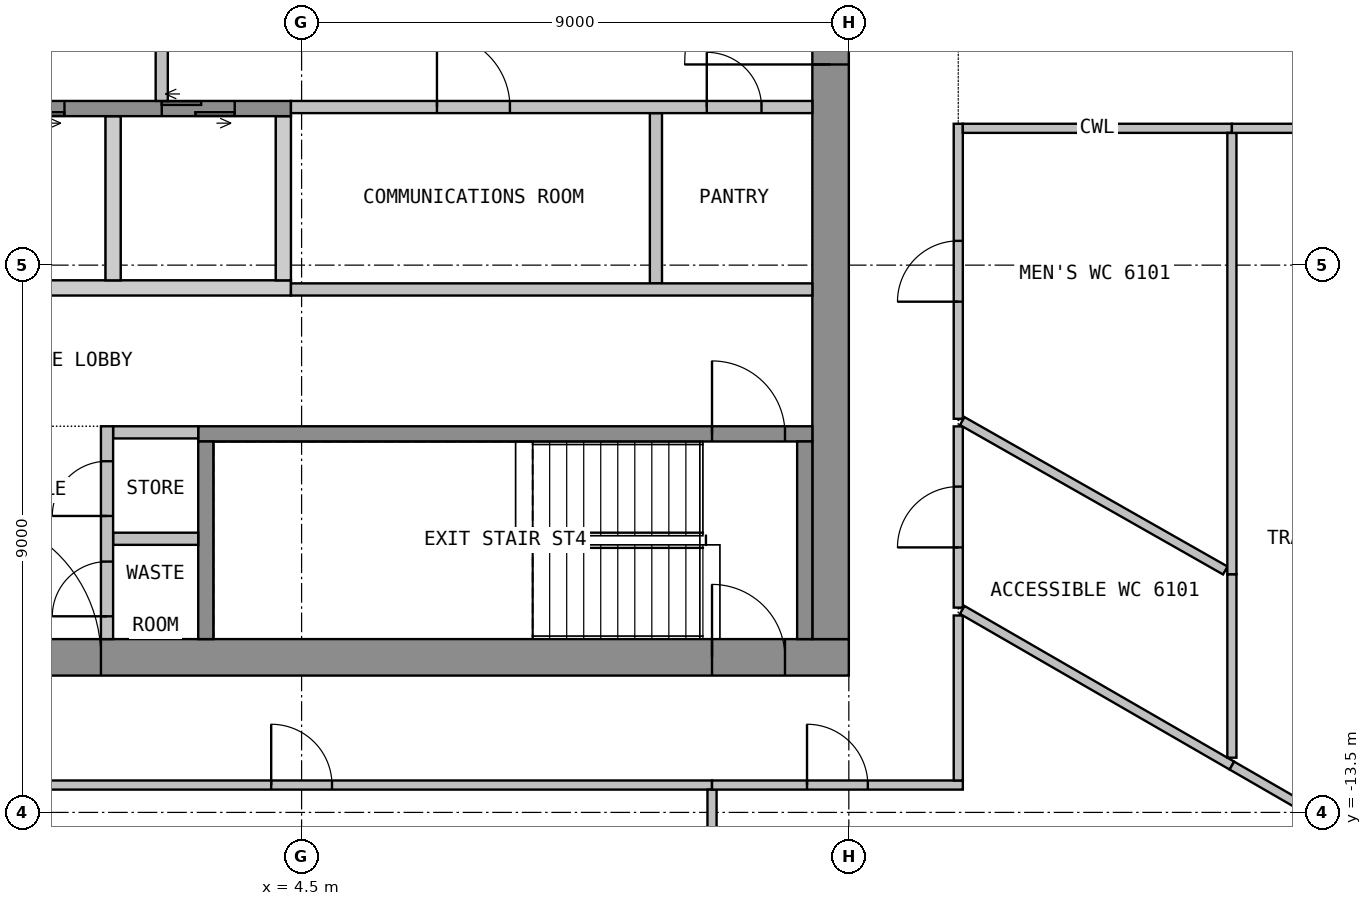
"""IFC4 building model, lengths in metres.
Left out: names, types, materials, properties, quantities, classifications, styles, units other than length and angle.
Written with IfcOpenShell. Run it as: python <this file> out.ifc"""

import sys

from ifc_helpers import new_model, si_unit, direction, frame, frame_2d, origin, place, context, subcontext, project, spatial, polyline, rectangle, outline, extrude, element, fill, save


model = new_model("IFC4")
c1 = context("Model", 3, precision=1e-05, world=origin(), true_north=direction((0.0, 1.0)))
c2 = subcontext(c1, "Body", "Model", "MODEL_VIEW")
j1 = project(units=[si_unit("LENGTHUNIT", "METRE"), si_unit("PLANEANGLEUNIT", "RADIAN")], contexts=[c1])
p1 = place(None, origin())
s1 = spatial("IfcSite", under=j1, at=p1, CompositionType="ELEMENT")
p2 = place(p1, origin())
s2 = spatial("IfcBuilding", under=s1, at=p2, CompositionType="ELEMENT")
p3 = place(p2, frame((0.0, 0.0, 246.9)))
s3 = spatial("IfcBuildingStorey", under=s2, at=p3, CompositionType="ELEMENT", Elevation=246.9)
p4 = place(p3, frame((-13.5, -10.95, 0.0), z_axis=(0.0, 0.0, 1.0), x_axis=(1.0, 0.0, 0.0)))
e1 = element("IfcWall", 1, at=p4, inside=s3, PredefinedType="SHEAR", context=c2, shape_type="SweptSolid", body=[
    extrude(rectangle(XDim=27.0, YDim=0.6, at=frame_2d((13.5, 0.0))), origin(), (0.0, 0.0, 1.0), 3.575),
])
p5 = place(p4, frame((12.3, 0.0, 0.0)))
e2 = element("IfcOpeningElement", 2, at=p5, cuts=e1, PredefinedType="OPENING", context=c2, shape_type="SweptSolid", body=[
    extrude(rectangle(XDim=2.4, YDim=2.1, at=frame_2d((1.2, 1.05))), frame((0.0, 0.31, 0.0), z_axis=(0.0, -1.0, 0.0), x_axis=(1.0, 0.0, 0.0)), (0.0, 0.0, 1.0), 0.62),
])
p6 = place(p4, frame((1.05, 0.0, 0.0)))
e3 = element("IfcOpeningElement", 3, at=p6, cuts=e1, PredefinedType="OPENING", context=c2, shape_type="SweptSolid", body=[
    extrude(rectangle(XDim=1.2, YDim=2.1, at=frame_2d((0.6, 1.05))), frame((0.0, 0.31, 0.0), z_axis=(0.0, -1.0, 0.0), x_axis=(1.0, 0.0, 0.0)), (0.0, 0.0, 1.0), 0.62),
])
p7 = place(p4, frame((24.75, 0.0, 0.0)))
e4 = element("IfcOpeningElement", 4, at=p7, cuts=e1, PredefinedType="OPENING", context=c2, shape_type="SweptSolid", body=[
    extrude(rectangle(XDim=1.2, YDim=2.1, at=frame_2d((0.6, 1.05))), frame((0.0, 0.31, 0.0), z_axis=(0.0, -1.0, 0.0), x_axis=(1.0, 0.0, 0.0)), (0.0, 0.0, 1.0), 0.62),
])
p8 = place(p3, frame((13.2, -10.65, 0.0), z_axis=(0.0, 0.0, 1.0), x_axis=(0.0, 1.0, 0.0)))
e5 = element("IfcWall", 5, at=p8, inside=s3, PredefinedType="SHEAR", context=c2, shape_type="SweptSolid", body=[
    extrude(rectangle(XDim=21.3, YDim=0.6, at=frame_2d((10.65, 0.0))), origin(), (0.0, 0.0, 1.0), 3.575),
])
p9 = place(p8, frame((9.45, 0.0, 0.0)))
e6 = element("IfcOpeningElement", 6, at=p9, cuts=e5, PredefinedType="OPENING", context=c2, shape_type="SweptSolid", body=[
    extrude(rectangle(XDim=2.4, YDim=2.1, at=frame_2d((1.2, 1.05))), frame((0.0, 0.31, 0.0), z_axis=(0.0, -1.0, 0.0), x_axis=(1.0, 0.0, 0.0)), (0.0, 0.0, 1.0), 0.62),
])
p10 = place(p3, origin())
e7 = element("IfcWall", 7, at=p10, inside=s3, PredefinedType="SHEAR", context=c2, shape_type="SweptSolid", body=[
    extrude(outline(polyline([(-1.525, -5.0), (4.325, -5.0), (4.325, -4.75), (-1.525, -4.75), (-1.525, -5.0)])), origin(), (0.0, 0.0, 1.0), 3.575),
])
p11 = place(p3, origin())
e8 = element("IfcWall", 8, at=p11, inside=s3, PredefinedType="SHEAR", context=c2, shape_type="SweptSolid", body=[
    extrude(outline(polyline([(1.275, -4.75), (1.525, -4.75), (1.525, -2.05), (1.275, -2.05), (1.275, -4.75)])), origin(), (0.0, 0.0, 1.0), 3.575),
])
p12 = place(p3, origin())
e9 = element("IfcWall", 9, at=p12, inside=s3, PredefinedType="SHEAR", context=c2, shape_type="SweptSolid", body=[
    extrude(outline(polyline([(4.075, -4.75), (4.325, -4.75), (4.325, -2.05), (4.075, -2.05), (4.075, -4.75)])), origin(), (0.0, 0.0, 1.0), 3.575),
])
p13 = place(p3, frame((-1.525, -1.925, 0.0), z_axis=(0.0, 0.0, 1.0), x_axis=(1.0, 0.0, 0.0)))
e10 = element("IfcWall", 10, at=p13, inside=s3, PredefinedType="SHEAR", context=c2, shape_type="SweptSolid", body=[
    extrude(rectangle(XDim=5.85, YDim=0.25, at=frame_2d((2.925, 0.0))), origin(), (0.0, 0.0, 1.0), 3.575),
])
p14 = place(p13, frame((0.925, 0.0, 0.0)))
e11 = element("IfcOpeningElement", 11, at=p14, cuts=e10, PredefinedType="OPENING", context=c2, shape_type="SweptSolid", body=[
    extrude(rectangle(XDim=1.2, YDim=2.1, at=frame_2d((0.6, 1.05))), frame((0.0, 0.135, 0.0), z_axis=(0.0, -1.0, 0.0), x_axis=(1.0, 0.0, 0.0)), (0.0, 0.0, 1.0), 0.27),
])
p15 = place(p13, frame((3.725, 0.0, 0.0)))
e12 = element("IfcOpeningElement", 12, at=p15, cuts=e10, PredefinedType="OPENING", context=c2, shape_type="SweptSolid", body=[
    extrude(rectangle(XDim=1.2, YDim=2.1, at=frame_2d((0.6, 1.05))), frame((0.0, 0.135, 0.0), z_axis=(0.0, -1.0, 0.0), x_axis=(1.0, 0.0, 0.0)), (0.0, 0.0, 1.0), 0.27),
])
p16 = place(p3, frame((2.2, -1.8, 0.0), z_axis=(0.0, 0.0, 1.0), x_axis=(0.0, 1.0, 0.0)))
e13 = element("IfcWall", 13, at=p16, inside=s3, PredefinedType="PARTITIONING", context=c2, shape_type="SweptSolid", body=[
    extrude(rectangle(XDim=3.6, YDim=0.2, at=frame_2d((1.8, 0.0))), origin(), (0.0, 0.0, 1.0), 3.575),
])
p17 = place(p16, frame((1.2, 0.0, 0.0)))
e14 = element("IfcOpeningElement", 14, at=p17, cuts=e13, PredefinedType="OPENING", context=c2, shape_type="SweptSolid", body=[
    extrude(rectangle(XDim=1.2, YDim=2.1, at=frame_2d((0.6, 1.05))), frame((0.0, 0.11, 0.0), z_axis=(0.0, -1.0, 0.0), x_axis=(1.0, 0.0, 0.0)), (0.0, 0.0, 1.0), 0.22),
])
p18 = place(p3, frame((2.8, -7.275, 0.0), z_axis=(0.0, 0.0, 1.0), x_axis=(1.0, 0.0, 0.0)))
e15 = element("IfcWall", 15, at=p18, inside=s3, PredefinedType="SHEAR", context=c2, shape_type="SweptSolid", body=[
    extrude(rectangle(XDim=10.1, YDim=0.25, at=frame_2d((5.05, 0.0))), origin(), (0.0, 0.0, 1.0), 3.575),
])
p19 = place(p18, frame((8.45, 0.0, 0.0)))
e16 = element("IfcOpeningElement", 16, at=p19, cuts=e15, PredefinedType="OPENING", context=c2, shape_type="SweptSolid", body=[
    extrude(rectangle(XDim=1.2, YDim=2.1, at=frame_2d((0.6, 1.05))), frame((0.0, 0.135, 0.0), z_axis=(0.0, -1.0, 0.0), x_axis=(1.0, 0.0, 0.0)), (0.0, 0.0, 1.0), 0.27),
])
for number, where, z_axis, x_axis in (
    (17, (2.925, -10.65, 0.0), (0.0, 0.0, 1.0), (0.0, 1.0, 0.0)),
    (18, (12.775, -10.65, 0.0), (0.0, 0.0, 1.0), (0.0, 1.0, 0.0)),
):
    element("IfcWall", number, at=place(p3, frame(where, z_axis=z_axis, x_axis=x_axis)), inside=s3, PredefinedType="SHEAR", context=c2, shape_type="SweptSolid", body=[
        extrude(rectangle(XDim=3.25, YDim=0.25, at=frame_2d((1.625, 0.0))), origin(), (0.0, 0.0, 1.0), 3.575),
    ])
for number, where, z_axis, x_axis in (
    (19, (1.4, -7.25, 0.0), (0.0, 0.0, 1.0), (1.0, 0.0, 0.0)),
    (20, (1.4, -9.0, 0.0), (0.0, 0.0, 1.0), (1.0, 0.0, 0.0)),
):
    element("IfcWall", number, at=place(p3, frame(where, z_axis=z_axis, x_axis=x_axis)), inside=s3, PredefinedType="PARTITIONING", context=c2, shape_type="SweptSolid", body=[
        extrude(rectangle(XDim=1.4, YDim=0.2, at=frame_2d((0.7, 0.0))), origin(), (0.0, 0.0, 1.0), 3.575),
    ])
p20 = place(p3, frame((1.3, -10.65, 0.0), z_axis=(0.0, 0.0, 1.0), x_axis=(0.0, 1.0, 0.0)))
e21 = element("IfcWall", 21, at=p20, inside=s3, PredefinedType="PARTITIONING", context=c2, shape_type="SweptSolid", body=[
    extrude(rectangle(XDim=3.5, YDim=0.2, at=frame_2d((1.75, 0.0))), origin(), (0.0, 0.0, 1.0), 3.575),
])
p21 = place(p20, frame((0.375, 0.0, 0.0)))
e22 = element("IfcOpeningElement", 22, at=p21, cuts=e21, PredefinedType="OPENING", context=c2, shape_type="SweptSolid", body=[
    extrude(rectangle(XDim=0.9, YDim=2.1, at=frame_2d((0.45, 1.05))), frame((0.0, 0.11, 0.0), z_axis=(0.0, -1.0, 0.0), x_axis=(1.0, 0.0, 0.0)), (0.0, 0.0, 1.0), 0.22),
])
p22 = place(p20, frame((2.025, 0.0, 0.0)))
e23 = element("IfcOpeningElement", 23, at=p22, cuts=e21, PredefinedType="OPENING", context=c2, shape_type="SweptSolid", body=[
    extrude(rectangle(XDim=0.9, YDim=2.1, at=frame_2d((0.45, 1.05))), frame((0.0, 0.11, 0.0), z_axis=(0.0, -1.0, 0.0), x_axis=(1.0, 0.0, 0.0)), (0.0, 0.0, 1.0), 0.22),
])
p23 = place(p3, frame((10.327, -4.8, 0.0), z_axis=(0.0, 0.0, 1.0), x_axis=(0.0, 1.0, 0.0)))
e24 = element("IfcWall", 24, at=p23, inside=s3, PredefinedType="PARTITIONING", context=c2, shape_type="SweptSolid", body=[
    extrude(rectangle(XDim=2.8, YDim=0.2, at=frame_2d((1.4, 0.0))), origin(), (0.0, 0.0, 1.0), 3.575),
])
p24 = place(p3, frame((4.325, -1.9, 0.0), z_axis=(0.0, 0.0, 1.0), x_axis=(1.0, 0.0, 0.0)))
e25 = element("IfcWall", 25, at=p24, inside=s3, PredefinedType="PARTITIONING", context=c2, shape_type="SweptSolid", body=[
    extrude(rectangle(XDim=8.575, YDim=0.2, at=frame_2d((4.288, 0.0))), origin(), (0.0, 0.0, 1.0), 3.575),
])
p25 = place(p24, frame((2.401, 0.0, 0.0)))
e26 = element("IfcOpeningElement", 26, at=p25, cuts=e25, PredefinedType="OPENING", context=c2, shape_type="SweptSolid", body=[
    extrude(rectangle(XDim=1.2, YDim=2.1, at=frame_2d((0.6, 1.05))), frame((0.0, 0.11, 0.0), z_axis=(0.0, -1.0, 0.0), x_axis=(1.0, 0.0, 0.0)), (0.0, 0.0, 1.0), 0.22),
])
p26 = place(p24, frame((6.839, 0.0, 0.0)))
e27 = element("IfcOpeningElement", 27, at=p26, cuts=e25, PredefinedType="OPENING", context=c2, shape_type="SweptSolid", body=[
    extrude(rectangle(XDim=0.9, YDim=2.1, at=frame_2d((0.45, 1.05))), frame((0.0, 0.11, 0.0), z_axis=(0.0, -1.0, 0.0), x_axis=(1.0, 0.0, 0.0)), (0.0, 0.0, 1.0), 0.22),
])
p27 = place(p3, frame((4.325, -4.9, 0.0), z_axis=(0.0, 0.0, 1.0), x_axis=(1.0, 0.0, 0.0)))
e28 = element("IfcWall", 28, at=p27, inside=s3, PredefinedType="PARTITIONING", context=c2, shape_type="SweptSolid", body=[
    extrude(rectangle(XDim=8.575, YDim=0.2, at=frame_2d((4.288, 0.0))), origin(), (0.0, 0.0, 1.0), 3.575),
])
p28 = place(p3, frame((-2.25, -13.05, 0.0), z_axis=(0.0, 0.0, 1.0), x_axis=(1.0, 0.0, 0.0)))
e29 = element("IfcWall", 29, at=p28, inside=s3, PredefinedType="PARTITIONING", context=c2, shape_type="SweptSolid", body=[
    extrude(rectangle(XDim=13.5, YDim=0.15, at=frame_2d((6.75, 0.0))), origin(), (0.0, 0.0, 1.0), 3.575),
])
p29 = place(p28, frame((6.25, 0.0, 0.0)))
e30 = element("IfcOpeningElement", 30, at=p29, cuts=e29, PredefinedType="OPENING", context=c2, shape_type="SweptSolid", body=[
    extrude(rectangle(XDim=1.0, YDim=2.1, at=frame_2d((0.5, 1.05))), frame((0.0, 0.085, 0.0), z_axis=(0.0, -1.0, 0.0), x_axis=(1.0, 0.0, 0.0)), (0.0, 0.0, 1.0), 0.17),
])
p30 = place(p3, frame((11.25, -13.125, 0.0), z_axis=(0.0, 0.0, 1.0), x_axis=(0.0, -1.0, 0.0)))
e31 = element("IfcWall", 31, at=p30, inside=s3, PredefinedType="PARTITIONING", context=c2, shape_type="SweptSolid", body=[
    extrude(rectangle(XDim=5.944, YDim=0.15, at=frame_2d((2.972, 0.0))), origin(), (0.0, 0.0, 1.0), 3.575),
])
p31 = place(p3, frame((11.25, -13.05, 0.0), z_axis=(0.0, 0.0, 1.0), x_axis=(1.0, 0.0, 0.0)))
e32 = element("IfcWall", 32, at=p31, inside=s3, PredefinedType="PARTITIONING", context=c2, shape_type="SweptSolid", body=[
    extrude(rectangle(XDim=4.125, YDim=0.15, at=frame_2d((2.062, 0.0))), origin(), (0.0, 0.0, 1.0), 3.575),
])
p32 = place(p31, frame((1.562, 0.0, 0.0)))
e33 = element("IfcOpeningElement", 33, at=p32, cuts=e32, PredefinedType="OPENING", context=c2, shape_type="SweptSolid", body=[
    extrude(rectangle(XDim=1.0, YDim=2.1, at=frame_2d((0.5, 1.05))), frame((0.0, 0.085, 0.0), z_axis=(0.0, -1.0, 0.0), x_axis=(1.0, 0.0, 0.0)), (0.0, 0.0, 1.0), 0.17),
])
p33 = place(p3, frame((15.3, -12.975, 0.0), z_axis=(0.0, 0.0, 1.0), x_axis=(0.0, 1.0, 0.0)))
e34 = element("IfcWall", 34, at=p33, inside=s3, PredefinedType="PARTITIONING", context=c2, shape_type="SweptSolid", body=[
    extrude(rectangle(XDim=2.713, YDim=0.15, at=frame_2d((1.356, 0.0))), origin(), (0.0, 0.0, 1.0), 3.575),
])
p34 = place(p3, frame((15.3, -10.132, 0.0), z_axis=(0.0, 0.0, 1.0), x_axis=(0.0, 1.0, 0.0)))
e35 = element("IfcWall", 35, at=p34, inside=s3, PredefinedType="PARTITIONING", context=c2, shape_type="SweptSolid", body=[
    extrude(rectangle(XDim=2.98, YDim=0.15, at=frame_2d((1.49, 0.0))), origin(), (0.0, 0.0, 1.0), 3.575),
])
p35 = place(p34, frame((0.99, 0.0, 0.0)))
e36 = element("IfcOpeningElement", 36, at=p35, cuts=e35, PredefinedType="OPENING", context=c2, shape_type="SweptSolid", body=[
    extrude(rectangle(XDim=1.0, YDim=2.1, at=frame_2d((0.5, 1.05))), frame((0.0, 0.085, 0.0), z_axis=(0.0, -1.0, 0.0), x_axis=(1.0, 0.0, 0.0)), (0.0, 0.0, 1.0), 0.17),
])
p36 = place(p3, frame((15.365, -10.169, 0.0), z_axis=(0.0, 0.0, 1.0), x_axis=(0.866028396804, -0.499994815902, 0.0)))
e37 = element("IfcWall", 37, at=p36, inside=s3, PredefinedType="PARTITIONING", context=c2, shape_type="SweptSolid", body=[
    extrude(rectangle(XDim=5.121, YDim=0.15, at=frame_2d((2.561, 0.0))), origin(), (0.0, 0.0, 1.0), 3.575),
])
p37 = place(p3, frame((15.3, -7.027, 0.0), z_axis=(0.0, 0.0, 1.0), x_axis=(0.0, 1.0, 0.0)))
e38 = element("IfcWall", 38, at=p37, inside=s3, PredefinedType="PARTITIONING", context=c2, shape_type="SweptSolid", body=[
    extrude(rectangle(XDim=4.852, YDim=0.15, at=frame_2d((2.426, 0.0))), origin(), (0.0, 0.0, 1.0), 3.575),
])
p38 = place(p37, frame((1.926, 0.0, 0.0)))
e39 = element("IfcOpeningElement", 39, at=p38, cuts=e38, PredefinedType="OPENING", context=c2, shape_type="SweptSolid", body=[
    extrude(rectangle(XDim=1.0, YDim=2.1, at=frame_2d((0.5, 1.05))), frame((0.0, 0.085, 0.0), z_axis=(0.0, -1.0, 0.0), x_axis=(1.0, 0.0, 0.0)), (0.0, 0.0, 1.0), 0.17),
])
p39 = place(p3, frame((15.365, -7.064, 0.0), z_axis=(0.0, 0.0, 1.0), x_axis=(0.869523611324, -0.493891374039, 0.0)))
e40 = element("IfcWall", 40, at=p39, inside=s3, PredefinedType="PARTITIONING", context=c2, shape_type="SweptSolid", body=[
    extrude(rectangle(XDim=4.975, YDim=0.15, at=frame_2d((2.488, 0.0))), origin(), (0.0, 0.0, 1.0), 3.575),
])
p40 = place(p3, frame((19.8, -2.25, 0.0), z_axis=(0.0, 0.0, 1.0), x_axis=(-1.0, 0.0, 0.0)))
e41 = element("IfcWall", 41, at=p40, inside=s3, PredefinedType="PARTITIONING", context=c2, shape_type="SweptSolid", body=[
    extrude(rectangle(XDim=4.425, YDim=0.15, at=frame_2d((2.212, 0.0))), origin(), (0.0, 0.0, 1.0), 3.575),
])
p41 = place(p3, frame((19.8, -9.583, 0.0), z_axis=(0.0, 0.0, 1.0), x_axis=(0.0, -1.0, 0.0)))
e42 = element("IfcWall", 42, at=p41, inside=s3, PredefinedType="PARTITIONING", context=c2, shape_type="SweptSolid", body=[
    extrude(rectangle(XDim=3.017, YDim=0.15, at=frame_2d((1.509, 0.0))), origin(), (0.0, 0.0, 1.0), 3.575),
])
p42 = place(p3, frame((19.8, -12.73, 0.0), z_axis=(0.0, 0.0, 1.0), x_axis=(0.865918715181, -0.500184744569, 0.0)))
e43 = element("IfcWall", 43, at=p42, inside=s3, PredefinedType="PARTITIONING", context=c2, shape_type="SweptSolid", body=[
    extrude(rectangle(XDim=1.402, YDim=0.15, at=frame_2d((0.701, 0.0))), origin(), (0.0, 0.0, 1.0), 3.575),
])
p43 = place(p3, frame((19.8, -2.325, 0.0), z_axis=(0.0, 0.0, 1.0), x_axis=(0.0, -1.0, 0.0)))
e44 = element("IfcWall", 44, at=p43, inside=s3, PredefinedType="PARTITIONING", context=c2, shape_type="SweptSolid", body=[
    extrude(rectangle(XDim=7.258, YDim=0.15, at=frame_2d((3.629, 0.0))), origin(), (0.0, 0.0, 1.0), 3.575),
])
p44 = place(p3, frame((27.452, -2.25, 0.0), z_axis=(0.0, 0.0, 1.0), x_axis=(-1.0, 0.0, 0.0)))
e45 = element("IfcWall", 45, at=p44, inside=s3, PredefinedType="PARTITIONING", context=c2, shape_type="SweptSolid", body=[
    extrude(rectangle(XDim=7.652, YDim=0.15, at=frame_2d((3.826, 0.0))), origin(), (0.0, 0.0, 1.0), 3.575),
])
p45 = place(p44, frame((3.326, 0.0, 0.0)))
e46 = element("IfcOpeningElement", 46, at=p45, cuts=e45, PredefinedType="OPENING", context=c2, shape_type="SweptSolid", body=[
    extrude(rectangle(XDim=1.0, YDim=2.1, at=frame_2d((0.5, 1.05))), frame((0.0, 0.085, 0.0), z_axis=(0.0, -1.0, 0.0), x_axis=(1.0, 0.0, 0.0)), (0.0, 0.0, 1.0), 0.17),
])
p46 = place(p9, origin())
e47 = element("IfcDoor", 47, at=p46, inside=s3, OperationType="DOUBLE_DOOR_DOUBLE_SWING", PredefinedType="DOOR", context=c2, shape_type="SweptSolid", body=[
    extrude(rectangle(XDim=2.4, YDim=2.1, at=frame_2d((1.2, 1.05))), frame((0.0, 0.025, 0.0), z_axis=(0.0, -1.0, 0.0), x_axis=(1.0, 0.0, 0.0)), (0.0, 0.0, 1.0), 0.05),
])
fill(e6, e47)
p47 = place(p5, origin())
e48 = element("IfcDoor", 48, at=p47, inside=s3, OperationType="DOUBLE_DOOR_DOUBLE_SWING", PredefinedType="DOOR", context=c2, shape_type="SweptSolid", body=[
    extrude(rectangle(XDim=2.4, YDim=2.1, at=frame_2d((1.2, 1.05))), frame((0.0, 0.025, 0.0), z_axis=(0.0, -1.0, 0.0), x_axis=(1.0, 0.0, 0.0)), (0.0, 0.0, 1.0), 0.05),
])
fill(e2, e48)
p48 = place(p7, origin())
e49 = element("IfcDoor", 49, at=p48, inside=s3, OperationType="SINGLE_SWING_RIGHT", PredefinedType="DOOR", context=c2, shape_type="SweptSolid", body=[
    extrude(rectangle(XDim=1.2, YDim=2.1, at=frame_2d((0.6, 1.05))), frame((0.0, 0.025, 0.0), z_axis=(0.0, -1.0, 0.0), x_axis=(1.0, 0.0, 0.0)), (0.0, 0.0, 1.0), 0.05),
])
fill(e4, e49)
p49 = place(p14, origin())
e50 = element("IfcDoor", 50, at=p49, inside=s3, OperationType="DOUBLE_DOOR_SLIDING", PredefinedType="DOOR", context=c2, shape_type="SweptSolid", body=[
    extrude(rectangle(XDim=1.2, YDim=2.1, at=frame_2d((0.6, 1.05))), frame((0.0, 0.025, 0.0), z_axis=(0.0, -1.0, 0.0), x_axis=(1.0, 0.0, 0.0)), (0.0, 0.0, 1.0), 0.05),
])
fill(e11, e50)
p50 = place(p15, origin())
e51 = element("IfcDoor", 51, at=p50, inside=s3, OperationType="DOUBLE_DOOR_SLIDING", PredefinedType="DOOR", context=c2, shape_type="SweptSolid", body=[
    extrude(rectangle(XDim=1.2, YDim=2.1, at=frame_2d((0.6, 1.05))), frame((0.0, 0.025, 0.0), z_axis=(0.0, -1.0, 0.0), x_axis=(1.0, 0.0, 0.0)), (0.0, 0.0, 1.0), 0.05),
])
fill(e12, e51)
p51 = place(p19, origin())
e52 = element("IfcDoor", 52, at=p51, inside=s3, OperationType="SINGLE_SWING_LEFT", PredefinedType="DOOR", context=c2, shape_type="SweptSolid", body=[
    extrude(rectangle(XDim=1.2, YDim=2.1, at=frame_2d((0.6, 1.05))), frame((0.0, 0.025, 0.0), z_axis=(0.0, -1.0, 0.0), x_axis=(1.0, 0.0, 0.0)), (0.0, 0.0, 1.0), 0.05),
])
fill(e16, e52)
p52 = place(p21, origin())
e53 = element("IfcDoor", 53, at=p52, inside=s3, OperationType="SINGLE_SWING_LEFT", PredefinedType="DOOR", context=c2, shape_type="SweptSolid", body=[
    extrude(rectangle(XDim=0.9, YDim=2.1, at=frame_2d((0.45, 1.05))), frame((0.0, 0.025, 0.0), z_axis=(0.0, -1.0, 0.0), x_axis=(1.0, 0.0, 0.0)), (0.0, 0.0, 1.0), 0.05),
])
fill(e22, e53)
p53 = place(p22, origin())
e54 = element("IfcDoor", 54, at=p53, inside=s3, OperationType="SINGLE_SWING_LEFT", PredefinedType="DOOR", context=c2, shape_type="SweptSolid", body=[
    extrude(rectangle(XDim=0.9, YDim=2.1, at=frame_2d((0.45, 1.05))), frame((0.0, 0.025, 0.0), z_axis=(0.0, -1.0, 0.0), x_axis=(1.0, 0.0, 0.0)), (0.0, 0.0, 1.0), 0.05),
])
fill(e23, e54)
p54 = place(p25, origin())
e55 = element("IfcDoor", 55, at=p54, inside=s3, OperationType="SINGLE_SWING_RIGHT", PredefinedType="DOOR", context=c2, shape_type="SweptSolid", body=[
    extrude(rectangle(XDim=1.2, YDim=2.1, at=frame_2d((0.6, 1.05))), frame((0.0, 0.025, 0.0), z_axis=(0.0, -1.0, 0.0), x_axis=(1.0, 0.0, 0.0)), (0.0, 0.0, 1.0), 0.05),
])
fill(e26, e55)
p55 = place(p26, origin())
e56 = element("IfcDoor", 56, at=p55, inside=s3, OperationType="SINGLE_SWING_LEFT", PredefinedType="DOOR", context=c2, shape_type="SweptSolid", body=[
    extrude(rectangle(XDim=0.9, YDim=2.1, at=frame_2d((0.45, 1.05))), frame((0.0, 0.025, 0.0), z_axis=(0.0, -1.0, 0.0), x_axis=(1.0, 0.0, 0.0)), (0.0, 0.0, 1.0), 0.05),
])
fill(e27, e56)
p56 = place(p29, origin())
e57 = element("IfcDoor", 57, at=p56, inside=s3, OperationType="SINGLE_SWING_RIGHT", PredefinedType="DOOR", context=c2, shape_type="SweptSolid", body=[
    extrude(rectangle(XDim=1.0, YDim=2.1, at=frame_2d((0.5, 1.05))), frame((0.0, 0.025, 0.0), z_axis=(0.0, -1.0, 0.0), x_axis=(1.0, 0.0, 0.0)), (0.0, 0.0, 1.0), 0.05),
])
fill(e30, e57)
p57 = place(p32, origin())
e58 = element("IfcDoor", 58, at=p57, inside=s3, OperationType="SINGLE_SWING_RIGHT", PredefinedType="DOOR", context=c2, shape_type="SweptSolid", body=[
    extrude(rectangle(XDim=1.0, YDim=2.1, at=frame_2d((0.5, 1.05))), frame((0.0, 0.025, 0.0), z_axis=(0.0, -1.0, 0.0), x_axis=(1.0, 0.0, 0.0)), (0.0, 0.0, 1.0), 0.05),
])
fill(e33, e58)
p58 = place(p35, origin())
e59 = element("IfcDoor", 59, at=p58, inside=s3, OperationType="SINGLE_SWING_RIGHT", PredefinedType="DOOR", context=c2, shape_type="SweptSolid", body=[
    extrude(rectangle(XDim=1.0, YDim=2.1, at=frame_2d((0.5, 1.05))), frame((0.0, 0.025, 0.0), z_axis=(0.0, -1.0, 0.0), x_axis=(1.0, 0.0, 0.0)), (0.0, 0.0, 1.0), 0.05),
])
fill(e36, e59)
p59 = place(p38, origin())
e60 = element("IfcDoor", 60, at=p59, inside=s3, OperationType="SINGLE_SWING_RIGHT", PredefinedType="DOOR", context=c2, shape_type="SweptSolid", body=[
    extrude(rectangle(XDim=1.0, YDim=2.1, at=frame_2d((0.5, 1.05))), frame((0.0, 0.025, 0.0), z_axis=(0.0, -1.0, 0.0), x_axis=(1.0, 0.0, 0.0)), (0.0, 0.0, 1.0), 0.05),
])
fill(e39, e60)
save(model, sys.argv[1])
